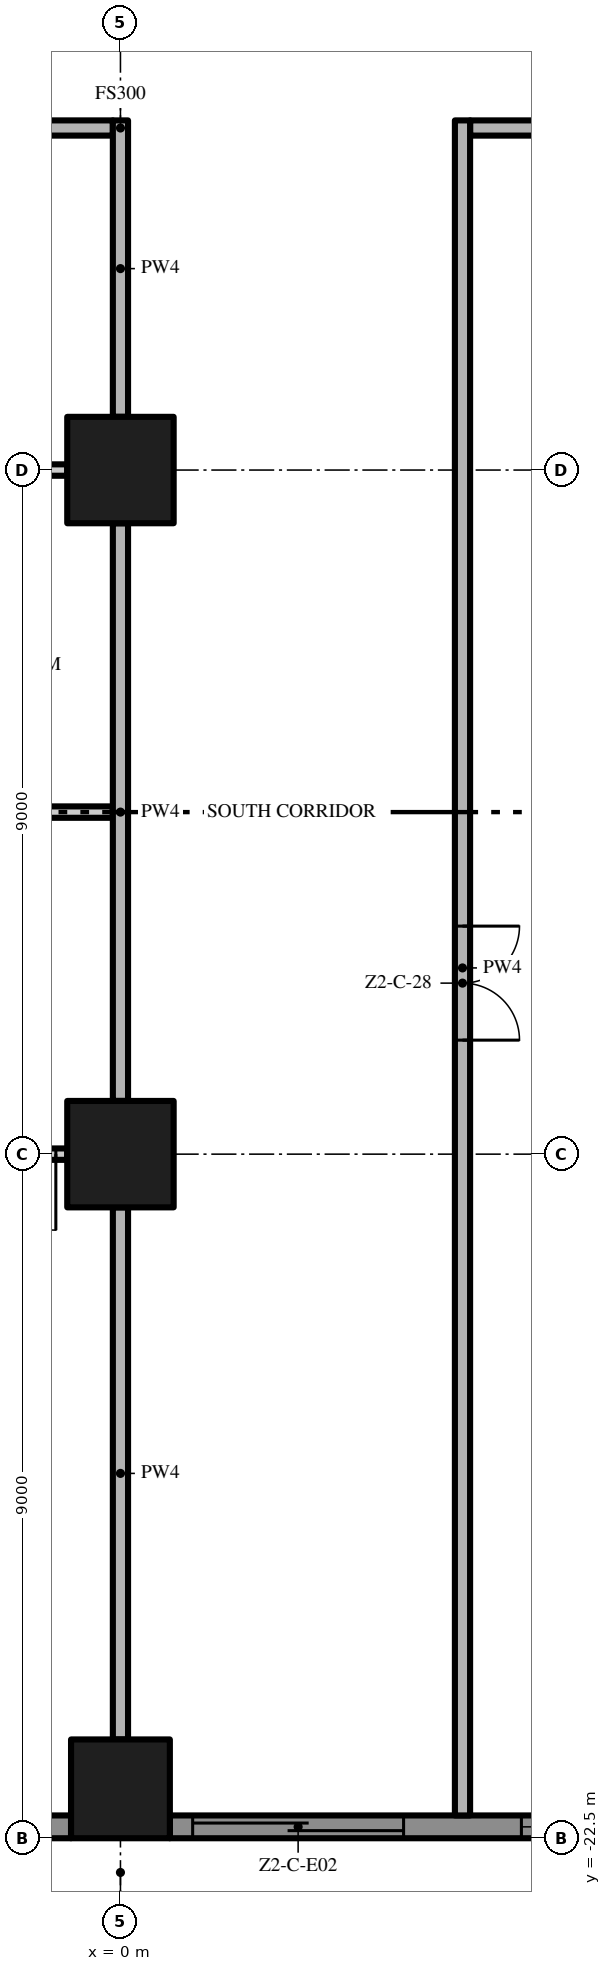
"""IFC4 building model, lengths in metres.
Left out: names, types, materials, properties, quantities, classifications, styles, units other than length and angle.
Written with IfcOpenShell. Run it as: python <this file> out.ifc"""

import sys

from ifc_helpers import new_model, si_unit, direction, frame, frame_2d, origin, origin_2d, place, context, subcontext, project, spatial, polyline, rectangle, outline, extrude, element, fill, save


model = new_model("IFC4")
c1 = context("Model", 3, precision=1e-05, world=origin(), true_north=direction((0.0, 1.0)))
c2 = subcontext(c1, "Body", "Model", "MODEL_VIEW")
j1 = project(units=[si_unit("LENGTHUNIT", "METRE"), si_unit("PLANEANGLEUNIT", "RADIAN")], contexts=[c1])
p1 = place(None, origin())
s1 = spatial("IfcSite", under=j1, at=p1, CompositionType="ELEMENT")
p2 = place(p1, origin())
s2 = spatial("IfcBuilding", under=s1, at=p2, CompositionType="ELEMENT")
p3 = place(p2, frame((0.0, 0.0, 92.2)))
s3 = spatial("IfcBuildingStorey", under=s2, at=p3, CompositionType="ELEMENT", Elevation=92.2)
p4 = place(p3, frame((0.0, -13.5, 0.0), z_axis=(0.0, 0.0, 1.0), x_axis=(1.0, 0.0, 0.0)))
e1 = element("IfcColumn", 1, at=p4, inside=s3, PredefinedType="COLUMN", context=c2, shape_type="SweptSolid", body=[
    extrude(rectangle(XDim=1.4, YDim=1.4, at=origin_2d()), origin(), (0.0, 0.0, 1.0), 3.5),
])
p5 = place(p3, frame((0.0, -21.85, 0.0), z_axis=(0.0, 0.0, 1.0), x_axis=(1.0, 0.0, 0.0)))
e2 = element("IfcColumn", 2, at=p5, inside=s3, PredefinedType="COLUMN", context=c2, shape_type="SweptSolid", body=[
    extrude(rectangle(XDim=1.3, YDim=1.3, at=origin_2d()), origin(), (0.0, 0.0, 1.0), 3.5),
])
p6 = place(p3, frame((0.0, -4.5, 0.0), z_axis=(0.0, 0.0, 1.0), x_axis=(1.0, 0.0, 0.0)))
e3 = element("IfcColumn", 3, at=p6, inside=s3, PredefinedType="COLUMN", context=c2, shape_type="SweptSolid", body=[
    extrude(rectangle(XDim=1.4, YDim=1.4, at=origin_2d()), origin(), (0.0, 0.0, 1.0), 3.5),
])
p7 = place(p3, frame((-0.65, -22.35, 0.0), z_axis=(0.0, 0.0, 1.0), x_axis=(-1.0, 0.0, 0.0)))
e4 = element("IfcWall", 4, at=p7, inside=s3, PredefinedType="SOLIDWALL", context=c2, shape_type="SweptSolid", body=[
    extrude(rectangle(XDim=7.7, YDim=0.3, at=frame_2d((3.85, 0.0))), origin(), (0.0, 0.0, 1.0), 3.5),
])
p8 = place(p7, frame((4.625, 0.0, 0.45)))
e5 = element("IfcOpeningElement", 5, at=p8, cuts=e4, PredefinedType="OPENING", context=c2, shape_type="SweptSolid", body=[
    extrude(rectangle(XDim=2.775, YDim=2.65, at=frame_2d((1.387, 1.325))), frame((0.0, 0.16, 0.0), z_axis=(0.0, -1.0, 0.0), x_axis=(1.0, 0.0, 0.0)), (0.0, 0.0, 1.0), 0.32),
])
p9 = place(p7, frame((0.3, 0.0, 0.45)))
e6 = element("IfcOpeningElement", 6, at=p9, cuts=e4, PredefinedType="OPENING", context=c2, shape_type="SweptSolid", body=[
    extrude(rectangle(XDim=2.775, YDim=2.65, at=frame_2d((1.387, 1.325))), frame((0.0, 0.16, 0.0), z_axis=(0.0, -1.0, 0.0), x_axis=(1.0, 0.0, 0.0)), (0.0, 0.0, 1.0), 0.32),
])
p10 = place(p3, frame((8.35, -22.35, 0.0), z_axis=(0.0, 0.0, 1.0), x_axis=(-1.0, 0.0, 0.0)))
e7 = element("IfcWall", 7, at=p10, inside=s3, PredefinedType="SOLIDWALL", context=c2, shape_type="SweptSolid", body=[
    extrude(rectangle(XDim=7.7, YDim=0.3, at=frame_2d((3.85, 0.0))), origin(), (0.0, 0.0, 1.0), 3.5),
])
p11 = place(p10, frame((4.625, 0.0, 0.0)))
e8 = element("IfcOpeningElement", 8, at=p11, cuts=e7, PredefinedType="OPENING", context=c2, shape_type="SweptSolid", body=[
    extrude(rectangle(XDim=2.775, YDim=2.4, at=frame_2d((1.387, 1.2))), frame((0.0, 0.16, 0.0), z_axis=(0.0, -1.0, 0.0), x_axis=(1.0, 0.0, 0.0)), (0.0, 0.0, 1.0), 0.32),
])
p12 = place(p10, frame((0.3, 0.0, 0.45)))
e9 = element("IfcOpeningElement", 9, at=p12, cuts=e7, PredefinedType="OPENING", context=c2, shape_type="SweptSolid", body=[
    extrude(rectangle(XDim=2.775, YDim=2.65, at=frame_2d((1.387, 1.325))), frame((0.0, 0.16, 0.0), z_axis=(0.0, -1.0, 0.0), x_axis=(1.0, 0.0, 0.0)), (0.0, 0.0, 1.0), 0.32),
])
p13 = place(p3, origin())
e10 = element("IfcWall", 10, at=p13, inside=s3, PredefinedType="USERDEFINED", context=c2, shape_type="SweptSolid", body=[
    extrude(outline(polyline([(-22.5, -24.3), (-21.0, -23.595), (-19.5, -23.159), (-18.75, -23.1), (-18.0, -23.159), (-16.5, -23.595), (-15.0, -24.3), (-13.5, -25.005), (-12.0, -25.441), (-11.25, -25.5), (-10.5, -25.441), (-9.0, -25.005), (-7.5, -24.3), (-6.0, -23.595), (-4.5, -23.159), (-3.75, -23.1), (-3.0, -23.159), (-1.5, -23.595), (0.0, -24.3), (1.5, -25.005), (3.0, -25.441), (3.75, -25.5), (4.5, -25.441), (6.0, -25.005), (7.5, -24.3), (9.0, -23.595), (10.5, -23.159), (11.25, -23.1), (12.0, -23.159), (13.5, -23.595), (15.0, -24.3), (16.5, -25.005), (18.0, -25.441), (18.75, -25.5), (19.5, -25.441), (21.0, -25.005), (22.5, -24.3), (22.394, -24.074), (20.911, -24.771), (19.455, -25.194), (18.75, -25.249), (18.045, -25.194), (16.589, -24.771), (15.106, -24.074), (13.589, -23.36), (12.045, -22.911), (11.25, -22.849), (10.455, -22.911), (8.911, -23.36), (7.394, -24.074), (5.911, -24.771), (4.455, -25.194), (3.75, -25.249), (3.045, -25.194), (1.589, -24.771), (0.106, -24.074), (-1.411, -23.36), (-2.955, -22.911), (-3.75, -22.849), (-4.545, -22.911), (-6.089, -23.36), (-7.606, -24.074), (-9.089, -24.771), (-10.545, -25.194), (-11.25, -25.249), (-11.955, -25.194), (-13.411, -24.771), (-14.894, -24.074), (-16.411, -23.36), (-17.955, -22.911), (-18.75, -22.849), (-19.545, -22.911), (-21.089, -23.36), (-22.606, -24.074), (-22.5, -24.3)])), origin(), (0.0, 0.0, 1.0), 0.9),
])
p14 = place(p3, frame((-0.7, -13.5, 0.0), z_axis=(0.0, 0.0, 1.0), x_axis=(-1.0, 0.0, 0.0)))
e11 = element("IfcWall", 11, at=p14, inside=s3, PredefinedType="PARTITIONING", context=c2, shape_type="SweptSolid", body=[
    extrude(rectangle(XDim=7.6, YDim=0.15, at=frame_2d((3.8, 0.0))), origin(), (0.0, 0.0, 1.0), 3.5),
])
p15 = place(p14, frame((6.45, 0.0, 0.0)))
e12 = element("IfcOpeningElement", 12, at=p15, cuts=e11, PredefinedType="OPENING", context=c2, shape_type="SweptSolid", body=[
    extrude(rectangle(XDim=1.0, YDim=2.4, at=frame_2d((0.5, 1.2))), frame((0.0, 0.085, 0.0), z_axis=(0.0, -1.0, 0.0), x_axis=(1.0, 0.0, 0.0)), (0.0, 0.0, 1.0), 0.17),
])
p16 = place(p14, frame((0.15, 0.0, 0.0)))
e13 = element("IfcOpeningElement", 13, at=p16, cuts=e11, PredefinedType="OPENING", context=c2, shape_type="SweptSolid", body=[
    extrude(rectangle(XDim=1.0, YDim=2.4, at=frame_2d((0.5, 1.2))), frame((0.0, 0.085, 0.0), z_axis=(0.0, -1.0, 0.0), x_axis=(1.0, 0.0, 0.0)), (0.0, 0.0, 1.0), 0.17),
])
p17 = place(p3, frame((-11.925, -9.0, 0.0), z_axis=(0.0, 0.0, 1.0), x_axis=(1.0, 0.0, 0.0)))
e14 = element("IfcWall", 14, at=p17, inside=s3, PredefinedType="PARTITIONING", context=c2, shape_type="SweptSolid", body=[
    extrude(rectangle(XDim=11.825, YDim=0.15, at=frame_2d((5.912, 0.0))), origin(), (0.0, 0.0, 1.0), 3.5),
])
p18 = place(p17, frame((1.0, 0.0, 0.0)))
e15 = element("IfcOpeningElement", 15, at=p18, cuts=e14, PredefinedType="OPENING", context=c2, shape_type="SweptSolid", body=[
    extrude(rectangle(XDim=0.9, YDim=2.1, at=frame_2d((0.45, 1.05))), frame((0.0, 0.085, 0.0), z_axis=(0.0, -1.0, 0.0), x_axis=(1.0, 0.0, 0.0)), (0.0, 0.0, 1.0), 0.17),
])
p19 = place(p17, frame((5.075, 0.0, 0.0)))
e16 = element("IfcOpeningElement", 16, at=p19, cuts=e14, PredefinedType="OPENING", context=c2, shape_type="SweptSolid", body=[
    extrude(rectangle(XDim=0.9, YDim=2.1, at=frame_2d((0.45, 1.05))), frame((0.0, 0.085, 0.0), z_axis=(0.0, -1.0, 0.0), x_axis=(1.0, 0.0, 0.0)), (0.0, 0.0, 1.0), 0.17),
])
p20 = place(p3, frame((-8.3, -4.5, 0.0), z_axis=(0.0, 0.0, 1.0), x_axis=(1.0, 0.0, 0.0)))
e17 = element("IfcWall", 17, at=p20, inside=s3, PredefinedType="PARTITIONING", context=c2, shape_type="SweptSolid", body=[
    extrude(rectangle(XDim=7.6, YDim=0.15, at=frame_2d((3.8, 0.0))), origin(), (0.0, 0.0, 1.0), 3.5),
])
p21 = place(p3, frame((-0.1, 0.0, 0.0), z_axis=(0.0, 0.0, 1.0), x_axis=(-1.0, 0.0, 0.0)))
e18 = element("IfcWall", 18, at=p21, inside=s3, PredefinedType="PARTITIONING", context=c2, shape_type="SweptSolid", body=[
    extrude(rectangle(XDim=17.3, YDim=0.2, at=frame_2d((8.65, 0.0))), origin(), (0.0, 0.0, 1.0), 3.5),
])
p22 = place(p21, frame((8.15, 0.0, 0.0)))
e19 = element("IfcOpeningElement", 19, at=p22, cuts=e18, PredefinedType="OPENING", context=c2, shape_type="SweptSolid", body=[
    extrude(rectangle(XDim=1.5, YDim=2.4, at=frame_2d((0.75, 1.2))), frame((0.0, 0.11, 0.0), z_axis=(0.0, -1.0, 0.0), x_axis=(1.0, 0.0, 0.0)), (0.0, 0.0, 1.0), 0.22),
])
p23 = place(p3, frame((4.6, 0.0, 0.0), z_axis=(0.0, 0.0, 1.0), x_axis=(1.0, 0.0, 0.0)))
e20 = element("IfcWall", 20, at=p23, inside=s3, PredefinedType="PARTITIONING", context=c2, shape_type="SweptSolid", body=[
    extrude(rectangle(XDim=12.8, YDim=0.2, at=frame_2d((6.4, 0.0))), origin(), (0.0, 0.0, 1.0), 3.5),
])
p24 = place(p3, frame((0.0, -21.2, 0.0), z_axis=(0.0, 0.0, 1.0), x_axis=(0.0, 1.0, 0.0)))
e21 = element("IfcWall", 21, at=p24, inside=s3, PredefinedType="PARTITIONING", context=c2, shape_type="SweptSolid", body=[
    extrude(rectangle(XDim=7.0, YDim=0.2, at=frame_2d((3.5, 0.0))), origin(), (0.0, 0.0, 1.0), 3.5),
])
p25 = place(p3, frame((0.0, -12.8, 0.0), z_axis=(0.0, 0.0, 1.0), x_axis=(0.0, 1.0, 0.0)))
e22 = element("IfcWall", 22, at=p25, inside=s3, PredefinedType="PARTITIONING", context=c2, shape_type="SweptSolid", body=[
    extrude(rectangle(XDim=7.6, YDim=0.2, at=frame_2d((3.8, 0.0))), origin(), (0.0, 0.0, 1.0), 3.5),
])
p26 = place(p3, frame((0.0, -3.8, 0.0), z_axis=(0.0, 0.0, 1.0), x_axis=(0.0, 1.0, 0.0)))
e23 = element("IfcWall", 23, at=p26, inside=s3, PredefinedType="PARTITIONING", context=c2, shape_type="SweptSolid", body=[
    extrude(rectangle(XDim=3.9, YDim=0.2, at=frame_2d((1.95, 0.0))), origin(), (0.0, 0.0, 1.0), 3.5),
])
p27 = place(p3, frame((4.5, 0.1, 0.0), z_axis=(0.0, 0.0, 1.0), x_axis=(0.0, -1.0, 0.0)))
e24 = element("IfcWall", 24, at=p27, inside=s3, PredefinedType="PARTITIONING", context=c2, shape_type="SweptSolid", body=[
    extrude(rectangle(XDim=22.3, YDim=0.2, at=frame_2d((11.15, 0.0))), origin(), (0.0, 0.0, 1.0), 3.5),
])
p28 = place(p27, frame((10.6, 0.0, 0.0)))
e25 = element("IfcOpeningElement", 25, at=p28, cuts=e24, PredefinedType="OPENING", context=c2, shape_type="SweptSolid", body=[
    extrude(rectangle(XDim=1.5, YDim=2.4, at=frame_2d((0.75, 1.2))), frame((0.0, 0.11, 0.0), z_axis=(0.0, -1.0, 0.0), x_axis=(1.0, 0.0, 0.0)), (0.0, 0.0, 1.0), 0.22),
])
p29 = place(p11, origin())
e26 = element("IfcDoor", 26, at=p29, inside=s3, OperationType="SINGLE_SWING_LEFT", PredefinedType="DOOR", context=c2, shape_type="SweptSolid", body=[
    extrude(rectangle(XDim=2.775, YDim=2.4, at=frame_2d((1.387, 1.2))), frame((0.0, 0.025, 0.0), z_axis=(0.0, -1.0, 0.0), x_axis=(1.0, 0.0, 0.0)), (0.0, 0.0, 1.0), 0.05),
])
fill(e8, e26)
p30 = place(p12, origin())
e27 = element("IfcWindow", 27, at=p30, inside=s3, PartitioningType="SINGLE_PANEL", PredefinedType="WINDOW", context=c2, shape_type="SweptSolid", body=[
    extrude(rectangle(XDim=2.775, YDim=2.65, at=frame_2d((1.387, 1.325))), frame((0.0, 0.03, 0.0), z_axis=(0.0, -1.0, 0.0), x_axis=(1.0, 0.0, 0.0)), (0.0, 0.0, 1.0), 0.06),
])
fill(e9, e27)
p31 = place(p16, origin())
e28 = element("IfcDoor", 28, at=p31, inside=s3, OperationType="SINGLE_SWING_LEFT", PredefinedType="DOOR", context=c2, shape_type="SweptSolid", body=[
    extrude(rectangle(XDim=1.0, YDim=2.4, at=frame_2d((0.5, 1.2))), frame((0.0, 0.025, 0.0), z_axis=(0.0, -1.0, 0.0), x_axis=(1.0, 0.0, 0.0)), (0.0, 0.0, 1.0), 0.05),
])
fill(e13, e28)
p32 = place(p28, origin())
e29 = element("IfcDoor", 29, at=p32, inside=s3, OperationType="DOUBLE_DOOR_SINGLE_SWING", PredefinedType="DOOR", context=c2, shape_type="SweptSolid", body=[
    extrude(rectangle(XDim=1.5, YDim=2.4, at=frame_2d((0.75, 1.2))), frame((0.0, 0.025, 0.0), z_axis=(0.0, -1.0, 0.0), x_axis=(1.0, 0.0, 0.0)), (0.0, 0.0, 1.0), 0.05),
])
fill(e25, e29)
save(model, sys.argv[1])
